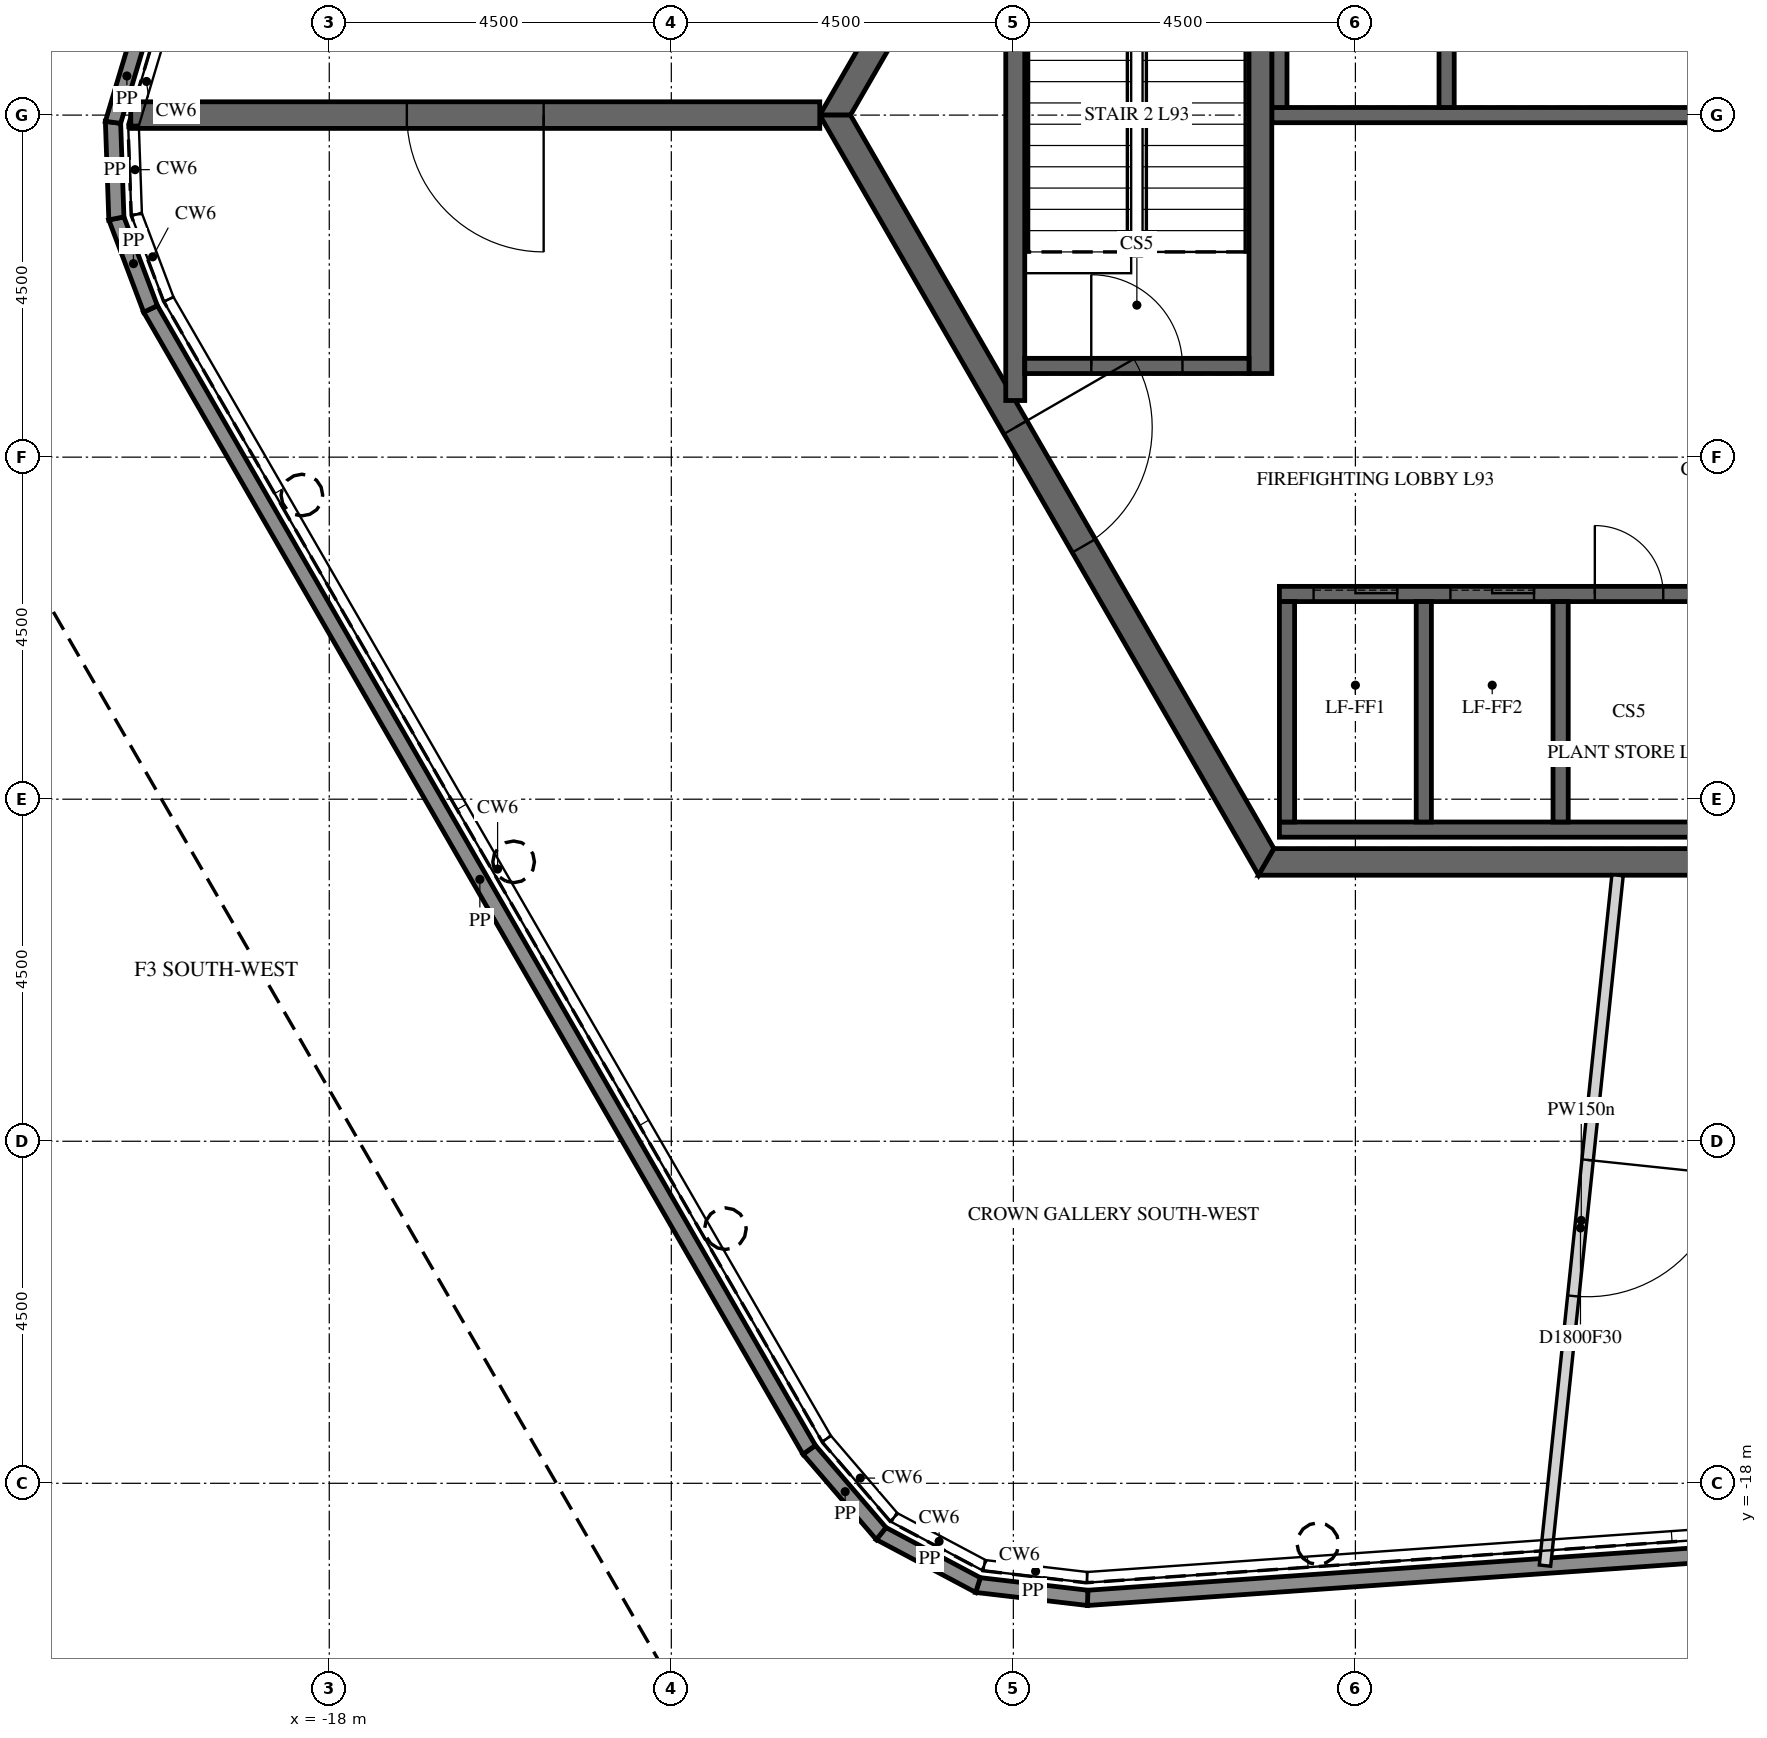
"""IFC4 building model, lengths in metres.
Left out: names, types, materials, properties, quantities, classifications, styles, units other than length and angle.
Written with IfcOpenShell. Run it as: python <this file> out.ifc"""

import sys

from ifc_helpers import new_model, si_unit, direction, frame, frame_2d, origin, place, context, subcontext, project, spatial, polyline, rectangle, outline, extrude, element, fill, save


model = new_model("IFC4")
c1 = context("Model", 3, precision=1e-05, world=origin(), true_north=direction((0.0, 1.0)))
c2 = subcontext(c1, "Body", "Model", "MODEL_VIEW")
j1 = project(units=[si_unit("LENGTHUNIT", "METRE"), si_unit("PLANEANGLEUNIT", "RADIAN")], contexts=[c1])
p1 = place(None, origin())
s1 = spatial("IfcSite", under=j1, at=p1, CompositionType="ELEMENT")
p2 = place(p1, origin())
s2 = spatial("IfcBuilding", under=s1, at=p2, CompositionType="ELEMENT")
p3 = place(p2, frame((0.0, 0.0, 392.7)))
s3 = spatial("IfcBuildingStorey", under=s2, at=p3, CompositionType="ELEMENT", Elevation=392.7)
p4 = place(p3, frame((9.266, -18.298, 4.5), z_axis=(0.0, 0.0, 1.0), x_axis=(-0.997563920068, -0.069758335553, 0.0)))
e1 = element("IfcWall", 1, at=p4, inside=s3, PredefinedType="PARAPET", context=c2, shape_type="SweptSolid", body=[
    extrude(outline(polyline([(0.008, -0.1), (17.322, -0.1), (17.34, 0.1), (-0.008, 0.1), (0.008, -0.1)])), origin(), (0.0, 0.0, 1.0), 1.1),
])
p5 = place(p3, frame((-8.022, -19.507, 4.5), z_axis=(0.0, 0.0, 1.0), x_axis=(-0.993253463588, 0.115963602348, 0.0)))
e2 = element("IfcWall", 2, at=p5, inside=s3, PredefinedType="PARAPET", context=c2, shape_type="SweptSolid", body=[
    extrude(outline(polyline([(0.009, -0.1), (1.434, -0.1), (1.471, 0.1), (-0.009, 0.1), (0.009, -0.1)])), origin(), (0.0, 0.0, 1.0), 1.1),
])
p6 = place(p3, frame((-9.465, -19.339, 4.5), z_axis=(0.0, 0.0, 1.0), x_axis=(-0.882946998442, 0.46947268072, 0.0)))
e3 = element("IfcWall", 3, at=p6, inside=s3, PredefinedType="PARAPET", context=c2, shape_type="SweptSolid", body=[
    extrude(outline(polyline([(0.019, -0.1), (1.424, -0.1), (1.462, 0.1), (-0.019, 0.1), (0.019, -0.1)])), origin(), (0.0, 0.0, 1.0), 1.1),
])
p7 = place(p3, frame((-10.74, -18.661, 4.5), z_axis=(0.0, 0.0, 1.0), x_axis=(-0.651635311812, 0.758532412228, 0.0)))
e4 = element("IfcWall", 4, at=p7, inside=s3, PredefinedType="PARAPET", context=c2, shape_type="SweptSolid", body=[
    extrude(outline(polyline([(0.019, -0.1), (1.443, -0.1), (1.462, 0.1), (-0.019, 0.1), (0.019, -0.1)])), origin(), (0.0, 0.0, 1.0), 1.1),
])
p8 = place(p3, frame((-11.686, -17.559, 4.5), z_axis=(0.0, 0.0, 1.0), x_axis=(-0.499996409458, 0.866027476775, 0.0)))
e5 = element("IfcWall", 5, at=p8, inside=s3, PredefinedType="PARAPET", context=c2, shape_type="SweptSolid", body=[
    extrude(outline(polyline([(0.009, -0.1), (17.323, -0.1), (17.339, 0.1), (-0.009, 0.1), (0.009, -0.1)])), origin(), (0.0, 0.0, 1.0), 1.1),
])
p9 = place(p3, frame((-20.352, -2.55, 4.5), z_axis=(0.0, 0.0, 1.0), x_axis=(-0.352930531417, 0.935649528399, 0.0)))
e6 = element("IfcWall", 6, at=p9, inside=s3, PredefinedType="PARAPET", context=c2, shape_type="SweptSolid", body=[
    extrude(outline(polyline([(0.008, -0.1), (1.256, -0.1), (1.289, 0.1), (-0.008, 0.1), (0.008, -0.1)])), origin(), (0.0, 0.0, 1.0), 1.1),
])
p10 = place(p3, frame((-20.801, -1.359, 4.5), z_axis=(0.0, 0.0, 1.0), x_axis=(-0.034940984606, 0.999389377367, 0.0)))
e7 = element("IfcWall", 7, at=p10, inside=s3, PredefinedType="PARAPET", context=c2, shape_type="SweptSolid", body=[
    extrude(outline(polyline([(0.016, -0.1), (1.248, -0.1), (1.281, 0.1), (-0.016, 0.1), (0.016, -0.1)])), origin(), (0.0, 0.0, 1.0), 1.1),
])
p11 = place(p3, frame((-20.845, -0.095, 4.5), z_axis=(0.0, 0.0, 1.0), x_axis=(0.286784667578, 0.957995070156, 0.0)))
e8 = element("IfcWall", 8, at=p11, inside=s3, PredefinedType="PARAPET", context=c2, shape_type="SweptSolid", body=[
    extrude(outline(polyline([(0.016, -0.1), (1.265, -0.1), (1.281, 0.1), (-0.016, 0.1), (0.016, -0.1)])), origin(), (0.0, 0.0, 1.0), 1.1),
])
p12 = place(p3, frame((-5.673, 9.825, -0.2), z_axis=(0.0, 0.0, 1.0), x_axis=(-0.499995046907, -0.866028263435, 0.0)))
e9 = element("IfcWall", 9, at=p12, inside=s3, PredefinedType="SHEAR", context=c2, shape_type="SweptSolid", body=[
    extrude(outline(polyline([(-0.101, -0.175), (11.446, -0.175), (11.244, 0.175), (0.101, 0.175), (-0.101, -0.175)])), origin(), (0.0, 0.0, 1.0), 4.5),
])
p13 = place(p12, frame((4.801, 0.0, 0.2)))
e10 = element("IfcOpeningElement", 10, at=p13, cuts=e9, PredefinedType="OPENING", context=c2, shape_type="SweptSolid", body=[
    extrude(rectangle(XDim=1.8, YDim=2.4, at=frame_2d((0.9, 1.2))), frame((0.0, 0.185, 0.0), z_axis=(0.0, -1.0, 0.0), x_axis=(1.0, 0.0, 0.0)), (0.0, 0.0, 1.0), 0.37),
])
p14 = place(p3, frame((-11.345, 0.0, -0.2), z_axis=(0.0, 0.0, 1.0), x_axis=(0.499995046907, -0.866028263435, 0.0)))
e11 = element("IfcWall", 11, at=p14, inside=s3, PredefinedType="SHEAR", context=c2, shape_type="SweptSolid", body=[
    extrude(outline(polyline([(-0.101, -0.175), (11.446, -0.175), (11.244, 0.175), (0.101, 0.175), (-0.101, -0.175)])), origin(), (0.0, 0.0, 1.0), 4.5),
])
p15 = place(p14, frame((4.744, 0.0, 0.2)))
e12 = element("IfcOpeningElement", 12, at=p15, cuts=e11, PredefinedType="OPENING", context=c2, shape_type="SweptSolid", body=[
    extrude(rectangle(XDim=1.8, YDim=2.4, at=frame_2d((0.9, 1.2))), frame((0.0, 0.185, 0.0), z_axis=(0.0, -1.0, 0.0), x_axis=(1.0, 0.0, 0.0)), (0.0, 0.0, 1.0), 0.37),
])
p16 = place(p3, frame((-5.673, -9.825, -0.2), z_axis=(0.0, 0.0, 1.0), x_axis=(1.0, 0.0, 0.0)))
e13 = element("IfcWall", 13, at=p16, inside=s3, PredefinedType="SHEAR", context=c2, shape_type="SweptSolid", body=[
    extrude(outline(polyline([(-0.101, -0.175), (11.446, -0.175), (11.244, 0.175), (0.101, 0.175), (-0.101, -0.175)])), origin(), (0.0, 0.0, 1.0), 4.5),
])
p17 = place(p3, frame((-11.547, 0.0, -0.2), z_axis=(0.0, 0.0, 1.0), x_axis=(-1.0, 0.0, 0.0)))
e14 = element("IfcWall", 14, at=p17, inside=s3, PredefinedType="SHEAR", context=c2, shape_type="SweptSolid", body=[
    extrude(rectangle(XDim=9.065, YDim=0.35, at=frame_2d((4.532, 0.0))), origin(), (0.0, 0.0, 1.0), 4.5),
])
p18 = place(p17, frame((3.632, 0.0, 0.2)))
e15 = element("IfcOpeningElement", 15, at=p18, cuts=e14, PredefinedType="OPENING", context=c2, shape_type="SweptSolid", body=[
    extrude(rectangle(XDim=1.8, YDim=2.4, at=frame_2d((0.9, 1.2))), frame((0.0, 0.185, 0.0), z_axis=(0.0, -1.0, 0.0), x_axis=(1.0, 0.0, 0.0)), (0.0, 0.0, 1.0), 0.37),
])
p19 = place(p3, frame((-5.6, 0.0, -0.2), z_axis=(0.0, 0.0, 1.0), x_axis=(1.0, 0.0, 0.0)))
e16 = element("IfcWall", 16, at=p19, inside=s3, PredefinedType="SHEAR", context=c2, shape_type="SweptSolid", body=[
    extrude(rectangle(XDim=11.2, YDim=0.2, at=frame_2d((5.6, 0.0))), origin(), (0.0, 0.0, 1.0), 4.5),
])
for number, where, z_axis, x_axis in (
    (17, (-5.5, 0.1, -0.2), (0.0, 0.0, 1.0), (0.0, 1.0, 0.0)),
    (18, (-3.3, 0.1, -0.2), (0.0, 0.0, 1.0), (0.0, 1.0, 0.0)),
):
    element("IfcWall", number, at=place(p3, frame(where, z_axis=z_axis, x_axis=x_axis)), inside=s3, PredefinedType="SHEAR", context=c2, shape_type="SweptSolid", body=[
        extrude(rectangle(XDim=3.1, YDim=0.2, at=frame_2d((1.55, 0.0))), origin(), (0.0, 0.0, 1.0), 4.5),
    ])
p20 = place(p3, frame((-5.5, -6.3, -0.2), z_axis=(0.0, 0.0, 1.0), x_axis=(1.0, 0.0, 0.0)))
e19 = element("IfcWall", 19, at=p20, inside=s3, PredefinedType="SHEAR", context=c2, shape_type="SweptSolid", body=[
    extrude(rectangle(XDim=9.2, YDim=0.2, at=frame_2d((4.6, 0.0))), origin(), (0.0, 0.0, 1.0), 4.5),
])
p21 = place(p20, frame((4.15, 0.0, 0.2)))
e20 = element("IfcOpeningElement", 20, at=p21, cuts=e19, PredefinedType="OPENING", context=c2, shape_type="SweptSolid", body=[
    extrude(rectangle(XDim=0.9, YDim=2.1, at=frame_2d((0.45, 1.05))), frame((0.0, 0.11, 0.0), z_axis=(0.0, -1.0, 0.0), x_axis=(1.0, 0.0, 0.0)), (0.0, 0.0, 1.0), 0.22),
])
p22 = place(p20, frame((7.75, 0.0, 0.2)))
e21 = element("IfcOpeningElement", 21, at=p22, cuts=e19, PredefinedType="OPENING", context=c2, shape_type="SweptSolid", body=[
    extrude(rectangle(XDim=0.9, YDim=2.1, at=frame_2d((0.45, 1.05))), frame((0.0, 0.11, 0.0), z_axis=(0.0, -1.0, 0.0), x_axis=(1.0, 0.0, 0.0)), (0.0, 0.0, 1.0), 0.22),
])
p23 = place(p20, frame((0.45, 0.0, 0.2)))
e22 = element("IfcOpeningElement", 22, at=p23, cuts=e19, PredefinedType="OPENING", context=c2, shape_type="SweptSolid", body=[
    extrude(rectangle(XDim=1.1, YDim=2.1, at=frame_2d((0.55, 1.05))), frame((0.0, 0.11, 0.0), z_axis=(0.0, -1.0, 0.0), x_axis=(1.0, 0.0, 0.0)), (0.0, 0.0, 1.0), 0.22),
])
p24 = place(p20, frame((2.25, 0.0, 0.2)))
e23 = element("IfcOpeningElement", 23, at=p24, cuts=e19, PredefinedType="OPENING", context=c2, shape_type="SweptSolid", body=[
    extrude(rectangle(XDim=1.1, YDim=2.1, at=frame_2d((0.55, 1.05))), frame((0.0, 0.11, 0.0), z_axis=(0.0, -1.0, 0.0), x_axis=(1.0, 0.0, 0.0)), (0.0, 0.0, 1.0), 0.22),
])
p25 = place(p20, frame((5.85, 0.0, 0.2)))
e24 = element("IfcOpeningElement", 24, at=p25, cuts=e19, PredefinedType="OPENING", context=c2, shape_type="SweptSolid", body=[
    extrude(rectangle(XDim=1.1, YDim=2.1, at=frame_2d((0.55, 1.05))), frame((0.0, 0.11, 0.0), z_axis=(0.0, -1.0, 0.0), x_axis=(1.0, 0.0, 0.0)), (0.0, 0.0, 1.0), 0.22),
])
p26 = place(p3, frame((-5.5, -9.4, -0.2), z_axis=(0.0, 0.0, 1.0), x_axis=(1.0, 0.0, 0.0)))
e25 = element("IfcWall", 25, at=p26, inside=s3, PredefinedType="SHEAR", context=c2, shape_type="SweptSolid", body=[
    extrude(rectangle(XDim=9.2, YDim=0.2, at=frame_2d((4.6, 0.0))), origin(), (0.0, 0.0, 1.0), 4.5),
])
for number, where, z_axis, x_axis in (
    (26, (-5.4, -9.3, -0.2), (0.0, 0.0, 1.0), (0.0, 1.0, 0.0)),
    (27, (-3.6, -9.3, -0.2), (0.0, 0.0, 1.0), (0.0, 1.0, 0.0)),
    (28, (-1.8, -9.3, -0.2), (0.0, 0.0, 1.0), (0.0, 1.0, 0.0)),
):
    element("IfcWall", number, at=place(p3, frame(where, z_axis=z_axis, x_axis=x_axis)), inside=s3, PredefinedType="SHEAR", context=c2, shape_type="SweptSolid", body=[
        extrude(rectangle(XDim=2.9, YDim=0.2, at=frame_2d((1.45, 0.0))), origin(), (0.0, 0.0, 1.0), 4.5),
    ])
p27 = place(p3, frame((-5.75, -3.4, -0.2), z_axis=(0.0, 0.0, 1.0), x_axis=(0.0, 1.0, 0.0)))
e29 = element("IfcWall", 29, at=p27, inside=s3, PredefinedType="SHEAR", context=c2, shape_type="SweptSolid", body=[
    extrude(rectangle(XDim=6.8, YDim=0.3, at=frame_2d((3.4, 0.0))), origin(), (0.0, 0.0, 1.0), 4.5),
])
p28 = place(p3, frame((-8.975, -3.755, -0.2), z_axis=(0.0, 0.0, 1.0), x_axis=(0.0, 1.0, 0.0)))
e30 = element("IfcWall", 30, at=p28, inside=s3, PredefinedType="SHEAR", context=c2, shape_type="SweptSolid", body=[
    extrude(rectangle(XDim=7.51, YDim=0.25, at=frame_2d((3.755, 0.0))), origin(), (0.0, 0.0, 1.0), 4.5),
])
p29 = place(p3, frame((-8.85, -3.3, -0.2), z_axis=(0.0, 0.0, 1.0), x_axis=(1.0, 0.0, 0.0)))
e31 = element("IfcWall", 31, at=p29, inside=s3, PredefinedType="SHEAR", context=c2, shape_type="SweptSolid", body=[
    extrude(rectangle(XDim=2.95, YDim=0.2, at=frame_2d((1.475, 0.0))), origin(), (0.0, 0.0, 1.0), 4.5),
])
p30 = place(p29, frame((0.875, 0.0, 0.2)))
e32 = element("IfcOpeningElement", 32, at=p30, cuts=e31, PredefinedType="OPENING", context=c2, shape_type="SweptSolid", body=[
    extrude(rectangle(XDim=1.2, YDim=2.4, at=frame_2d((0.6, 1.2))), frame((0.0, 0.11, 0.0), z_axis=(0.0, -1.0, 0.0), x_axis=(1.0, 0.0, 0.0)), (0.0, 0.0, 1.0), 0.22),
])
p31 = place(p3, frame((-1.051, -10.0, 0.0), z_axis=(0.0, 0.0, 1.0), x_axis=(-0.104547024574, -0.994519944321, 0.0)))
e33 = element("IfcWall", 33, at=p31, inside=s3, PredefinedType="PARTITIONING", context=c2, shape_type="SweptSolid", body=[
    extrude(rectangle(XDim=9.133, YDim=0.15, at=frame_2d((4.566, 0.0))), origin(), (0.0, 0.0, 1.0), 4.3),
])
p32 = place(p31, frame((3.767, 0.0, 0.0)))
e34 = element("IfcOpeningElement", 34, at=p32, cuts=e33, PredefinedType="OPENING", context=c2, shape_type="SweptSolid", body=[
    extrude(rectangle(XDim=1.8, YDim=2.1, at=frame_2d((0.9, 1.05))), frame((0.0, 0.085, 0.0), z_axis=(0.0, -1.0, 0.0), x_axis=(1.0, 0.0, 0.0)), (0.0, 0.0, 1.0), 0.17),
])
p33 = place(p15, origin())
e35 = element("IfcDoor", 35, at=p33, inside=s3, OperationType="DOUBLE_DOOR_SINGLE_SWING", PredefinedType="DOOR", context=c2, shape_type="SweptSolid", body=[
    extrude(rectangle(XDim=1.8, YDim=2.4, at=frame_2d((0.9, 1.2))), frame((0.0, 0.025, 0.0), z_axis=(0.0, -1.0, 0.0), x_axis=(1.0, 0.0, 0.0)), (0.0, 0.0, 1.0), 0.05),
])
fill(e12, e35)
p34 = place(p18, origin())
e36 = element("IfcDoor", 36, at=p34, inside=s3, OperationType="DOUBLE_DOOR_SINGLE_SWING", PredefinedType="DOOR", context=c2, shape_type="SweptSolid", body=[
    extrude(rectangle(XDim=1.8, YDim=2.4, at=frame_2d((0.9, 1.2))), frame((0.0, 0.025, 0.0), z_axis=(0.0, -1.0, 0.0), x_axis=(1.0, 0.0, 0.0)), (0.0, 0.0, 1.0), 0.05),
])
fill(e15, e36)
p35 = place(p21, origin())
e37 = element("IfcDoor", 37, at=p35, inside=s3, OperationType="SINGLE_SWING_LEFT", PredefinedType="DOOR", context=c2, shape_type="SweptSolid", body=[
    extrude(rectangle(XDim=0.9, YDim=2.1, at=frame_2d((0.45, 1.05))), frame((0.0, 0.025, 0.0), z_axis=(0.0, -1.0, 0.0), x_axis=(1.0, 0.0, 0.0)), (0.0, 0.0, 1.0), 0.05),
])
fill(e20, e37)
p36 = place(p30, origin())
e38 = element("IfcDoor", 38, at=p36, inside=s3, OperationType="SINGLE_SWING_LEFT", PredefinedType="DOOR", context=c2, shape_type="SweptSolid", body=[
    extrude(rectangle(XDim=1.2, YDim=2.4, at=frame_2d((0.6, 1.2))), frame((0.0, 0.025, 0.0), z_axis=(0.0, -1.0, 0.0), x_axis=(1.0, 0.0, 0.0)), (0.0, 0.0, 1.0), 0.05),
])
fill(e32, e38)
p37 = place(p23, origin())
e39 = element("IfcDoor", 39, at=p37, inside=s3, OperationType="SLIDING_TO_LEFT", PredefinedType="DOOR", context=c2, shape_type="SweptSolid", body=[
    extrude(rectangle(XDim=1.1, YDim=2.1, at=frame_2d((0.55, 1.05))), frame((0.0, 0.025, 0.0), z_axis=(0.0, -1.0, 0.0), x_axis=(1.0, 0.0, 0.0)), (0.0, 0.0, 1.0), 0.05),
])
fill(e22, e39)
p38 = place(p24, origin())
e40 = element("IfcDoor", 40, at=p38, inside=s3, OperationType="SLIDING_TO_LEFT", PredefinedType="DOOR", context=c2, shape_type="SweptSolid", body=[
    extrude(rectangle(XDim=1.1, YDim=2.1, at=frame_2d((0.55, 1.05))), frame((0.0, 0.025, 0.0), z_axis=(0.0, -1.0, 0.0), x_axis=(1.0, 0.0, 0.0)), (0.0, 0.0, 1.0), 0.05),
])
fill(e23, e40)
p39 = place(p32, origin())
e41 = element("IfcDoor", 41, at=p39, inside=s3, OperationType="DOUBLE_DOOR_SINGLE_SWING", PredefinedType="DOOR", context=c2, shape_type="SweptSolid", body=[
    extrude(rectangle(XDim=1.8, YDim=2.1, at=frame_2d((0.9, 1.05))), frame((0.0, 0.025, 0.0), z_axis=(0.0, -1.0, 0.0), x_axis=(1.0, 0.0, 0.0)), (0.0, 0.0, 1.0), 0.05),
])
fill(e34, e41)
save(model, sys.argv[1])
